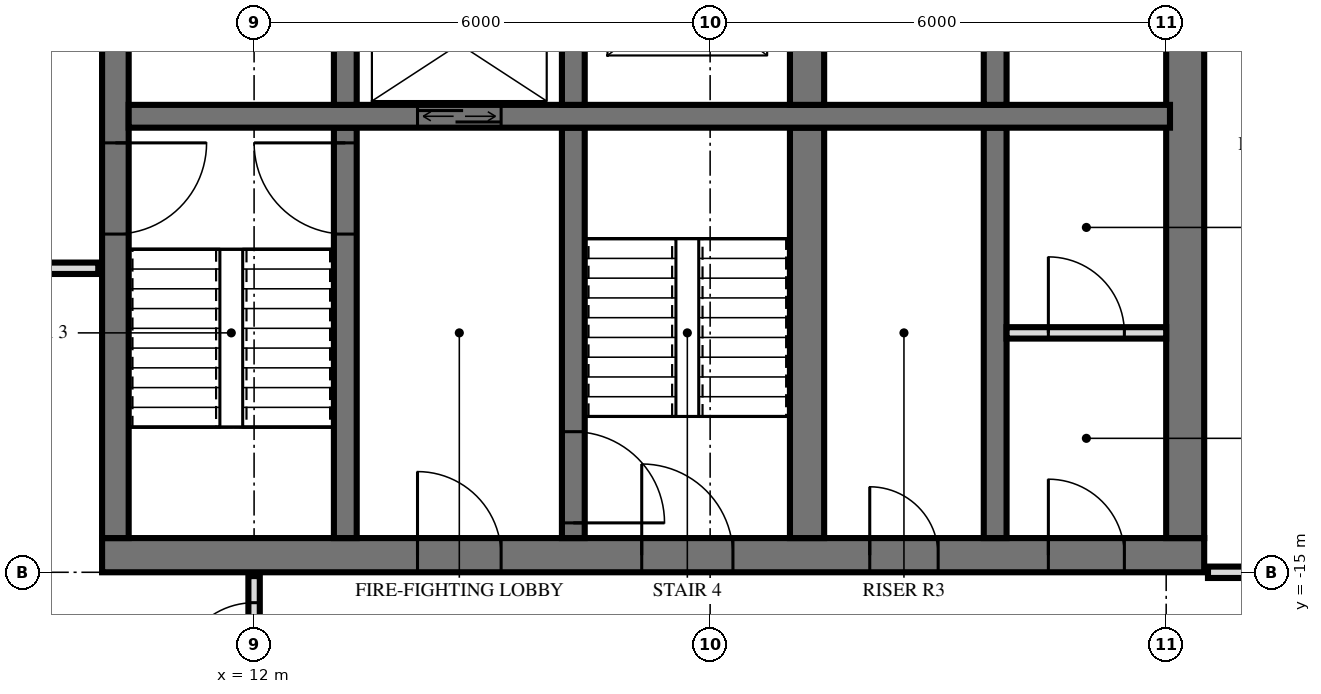
"""IFC4 building model, lengths in metres.
Left out: names, types, materials, properties, quantities, classifications, styles, units other than length and angle.
Written with IfcOpenShell. Run it as: python <this file> out.ifc"""

import sys

from ifc_helpers import new_model, si_unit, direction, frame, frame_2d, origin, place, context, subcontext, project, spatial, rectangle, extrude, element, fill, save


model = new_model("IFC4")
c1 = context("Model", 3, precision=1e-05, world=origin(), true_north=direction((0.0, 1.0)))
c2 = subcontext(c1, "Body", "Model", "MODEL_VIEW")
j1 = project(units=[si_unit("LENGTHUNIT", "METRE"), si_unit("PLANEANGLEUNIT", "RADIAN")], contexts=[c1])
p1 = place(None, origin())
s1 = spatial("IfcSite", under=j1, at=p1, CompositionType="ELEMENT")
p2 = place(p1, origin())
s2 = spatial("IfcBuilding", under=s1, at=p2, CompositionType="ELEMENT")
p3 = place(p2, frame((0.0, 0.0, 112.8)))
s3 = spatial("IfcBuildingStorey", under=s2, at=p3, CompositionType="ELEMENT", Elevation=112.8)
p4 = place(p3, frame((10.0, -14.775, 0.0), z_axis=(0.0, 0.0, 1.0), x_axis=(1.0, 0.0, 0.0)))
e1 = element("IfcWall", 1, at=p4, inside=s3, PredefinedType="SHEAR", context=c2, shape_type="SweptSolid", body=[
    extrude(rectangle(XDim=14.5, YDim=0.45, at=frame_2d((7.25, 0.0))), origin(), (0.0, 0.0, 1.0), 3.6),
])
p5 = place(p4, frame((7.1, 0.0, 0.0)))
e2 = element("IfcOpeningElement", 2, at=p5, cuts=e1, PredefinedType="OPENING", context=c2, shape_type="SweptSolid", body=[
    extrude(rectangle(XDim=1.2, YDim=2.1, at=frame_2d((0.6, 1.05))), frame((0.0, 0.235, 0.0), z_axis=(0.0, -1.0, 0.0), x_axis=(1.0, 0.0, 0.0)), (0.0, 0.0, 1.0), 0.47),
])
p6 = place(p4, frame((4.15, 0.0, 0.0)))
e3 = element("IfcOpeningElement", 3, at=p6, cuts=e1, PredefinedType="OPENING", context=c2, shape_type="SweptSolid", body=[
    extrude(rectangle(XDim=1.1, YDim=2.1, at=frame_2d((0.55, 1.05))), frame((0.0, 0.235, 0.0), z_axis=(0.0, -1.0, 0.0), x_axis=(1.0, 0.0, 0.0)), (0.0, 0.0, 1.0), 0.47),
])
p7 = place(p4, frame((10.1, 0.0, 0.0)))
e4 = element("IfcOpeningElement", 4, at=p7, cuts=e1, PredefinedType="OPENING", context=c2, shape_type="SweptSolid", body=[
    extrude(rectangle(XDim=0.9, YDim=2.1, at=frame_2d((0.45, 1.05))), frame((0.0, 0.235, 0.0), z_axis=(0.0, -1.0, 0.0), x_axis=(1.0, 0.0, 0.0)), (0.0, 0.0, 1.0), 0.47),
])
p8 = place(p4, frame((12.45, 0.0, 0.0)))
e5 = element("IfcOpeningElement", 5, at=p8, cuts=e1, PredefinedType="OPENING", context=c2, shape_type="SweptSolid", body=[
    extrude(rectangle(XDim=1.0, YDim=2.1, at=frame_2d((0.5, 1.05))), frame((0.0, 0.235, 0.0), z_axis=(0.0, -1.0, 0.0), x_axis=(1.0, 0.0, 0.0)), (0.0, 0.0, 1.0), 0.47),
])
p9 = place(p3, frame((10.175, -14.55, 0.0), z_axis=(0.0, 0.0, 1.0), x_axis=(0.0, 1.0, 0.0)))
e6 = element("IfcWall", 6, at=p9, inside=s3, PredefinedType="SHEAR", context=c2, shape_type="SweptSolid", body=[
    extrude(rectangle(XDim=14.1, YDim=0.35, at=frame_2d((7.05, 0.0))), origin(), (0.0, 0.0, 1.0), 3.6),
])
p10 = place(p9, frame((8.4, 0.0, 0.0)))
e7 = element("IfcOpeningElement", 7, at=p10, cuts=e6, PredefinedType="OPENING", context=c2, shape_type="SweptSolid", body=[
    extrude(rectangle(XDim=1.4, YDim=2.4, at=frame_2d((0.7, 1.2))), frame((0.0, 0.185, 0.0), z_axis=(0.0, -1.0, 0.0), x_axis=(1.0, 0.0, 0.0)), (0.0, 0.0, 1.0), 0.37),
])
p11 = place(p9, frame((10.0, 0.0, 0.0)))
e8 = element("IfcOpeningElement", 8, at=p11, cuts=e6, PredefinedType="OPENING", context=c2, shape_type="SweptSolid", body=[
    extrude(rectangle(XDim=1.4, YDim=2.4, at=frame_2d((0.7, 1.2))), frame((0.0, 0.185, 0.0), z_axis=(0.0, -1.0, 0.0), x_axis=(1.0, 0.0, 0.0)), (0.0, 0.0, 1.0), 0.37),
])
p12 = place(p9, frame((4.0, 0.0, 0.0)))
e9 = element("IfcOpeningElement", 9, at=p12, cuts=e6, PredefinedType="OPENING", context=c2, shape_type="SweptSolid", body=[
    extrude(rectangle(XDim=1.2, YDim=2.1, at=frame_2d((0.6, 1.05))), frame((0.0, 0.185, 0.0), z_axis=(0.0, -1.0, 0.0), x_axis=(1.0, 0.0, 0.0)), (0.0, 0.0, 1.0), 0.37),
])
p13 = place(p3, frame((24.25, -14.55, 0.0), z_axis=(0.0, 0.0, 1.0), x_axis=(0.0, 1.0, 0.0)))
e10 = element("IfcWall", 10, at=p13, inside=s3, PredefinedType="SHEAR", context=c2, shape_type="SweptSolid", body=[
    extrude(rectangle(XDim=14.1, YDim=0.5, at=frame_2d((7.05, 0.0))), origin(), (0.0, 0.0, 1.0), 3.6),
])
p14 = place(p3, frame((10.35, -9.0, 0.0), z_axis=(0.0, 0.0, 1.0), x_axis=(1.0, 0.0, 0.0)))
e11 = element("IfcWall", 11, at=p14, inside=s3, PredefinedType="SHEAR", context=c2, shape_type="SweptSolid", body=[
    extrude(rectangle(XDim=13.7, YDim=0.3, at=frame_2d((6.85, 0.0))), origin(), (0.0, 0.0, 1.0), 3.6),
])
p15 = place(p14, frame((3.8, 0.0, 0.0)))
e12 = element("IfcOpeningElement", 12, at=p15, cuts=e11, PredefinedType="OPENING", context=c2, shape_type="SweptSolid", body=[
    extrude(rectangle(XDim=1.1, YDim=2.1, at=frame_2d((0.55, 1.05))), frame((0.0, 0.16, 0.0), z_axis=(0.0, -1.0, 0.0), x_axis=(1.0, 0.0, 0.0)), (0.0, 0.0, 1.0), 0.32),
])
p16 = place(p3, frame((13.2, -8.85, 0.0), z_axis=(0.0, 0.0, 1.0), x_axis=(0.0, 1.0, 0.0)))
e13 = element("IfcWall", 13, at=p16, inside=s3, PredefinedType="SHEAR", context=c2, shape_type="SweptSolid", body=[
    extrude(rectangle(XDim=2.3, YDim=0.3, at=frame_2d((1.15, 0.0))), origin(), (0.0, 0.0, 1.0), 3.6),
])
p17 = place(p3, frame((13.2, -14.55, 0.0), z_axis=(0.0, 0.0, 1.0), x_axis=(0.0, 1.0, 0.0)))
e14 = element("IfcWall", 14, at=p17, inside=s3, PredefinedType="SHEAR", context=c2, shape_type="SweptSolid", body=[
    extrude(rectangle(XDim=5.4, YDim=0.3, at=frame_2d((2.7, 0.0))), origin(), (0.0, 0.0, 1.0), 3.6),
])
p18 = place(p17, frame((4.0, 0.0, 0.0)))
e15 = element("IfcOpeningElement", 15, at=p18, cuts=e14, PredefinedType="OPENING", context=c2, shape_type="SweptSolid", body=[
    extrude(rectangle(XDim=1.2, YDim=2.1, at=frame_2d((0.6, 1.05))), frame((0.0, 0.16, 0.0), z_axis=(0.0, -1.0, 0.0), x_axis=(1.0, 0.0, 0.0)), (0.0, 0.0, 1.0), 0.32),
])
p19 = place(p3, frame((16.2, -8.85, 0.0), z_axis=(0.0, 0.0, 1.0), x_axis=(0.0, 1.0, 0.0)))
e16 = element("IfcWall", 16, at=p19, inside=s3, PredefinedType="SHEAR", context=c2, shape_type="SweptSolid", body=[
    extrude(rectangle(XDim=2.3, YDim=0.3, at=frame_2d((1.15, 0.0))), origin(), (0.0, 0.0, 1.0), 3.6),
])
p20 = place(p3, frame((16.2, -14.55, 0.0), z_axis=(0.0, 0.0, 1.0), x_axis=(0.0, 1.0, 0.0)))
e17 = element("IfcWall", 17, at=p20, inside=s3, PredefinedType="SHEAR", context=c2, shape_type="SweptSolid", body=[
    extrude(rectangle(XDim=5.4, YDim=0.3, at=frame_2d((2.7, 0.0))), origin(), (0.0, 0.0, 1.0), 3.6),
])
p21 = place(p20, frame((0.2, 0.0, 0.0)))
e18 = element("IfcOpeningElement", 18, at=p21, cuts=e17, PredefinedType="OPENING", context=c2, shape_type="SweptSolid", body=[
    extrude(rectangle(XDim=1.2, YDim=2.1, at=frame_2d((0.6, 1.05))), frame((0.0, 0.16, 0.0), z_axis=(0.0, -1.0, 0.0), x_axis=(1.0, 0.0, 0.0)), (0.0, 0.0, 1.0), 0.32),
])
p22 = place(p3, frame((19.275, -8.85, 0.0), z_axis=(0.0, 0.0, 1.0), x_axis=(0.0, 1.0, 0.0)))
e19 = element("IfcWall", 19, at=p22, inside=s3, PredefinedType="SHEAR", context=c2, shape_type="SweptSolid", body=[
    extrude(rectangle(XDim=2.3, YDim=0.45, at=frame_2d((1.15, 0.0))), origin(), (0.0, 0.0, 1.0), 3.6),
])
p23 = place(p3, frame((19.275, -14.55, 0.0), z_axis=(0.0, 0.0, 1.0), x_axis=(0.0, 1.0, 0.0)))
e20 = element("IfcWall", 20, at=p23, inside=s3, PredefinedType="SHEAR", context=c2, shape_type="SweptSolid", body=[
    extrude(rectangle(XDim=5.4, YDim=0.45, at=frame_2d((2.7, 0.0))), origin(), (0.0, 0.0, 1.0), 3.6),
])
p24 = place(p3, frame((21.75, -8.85, 0.0), z_axis=(0.0, 0.0, 1.0), x_axis=(0.0, 1.0, 0.0)))
e21 = element("IfcWall", 21, at=p24, inside=s3, PredefinedType="SHEAR", context=c2, shape_type="SweptSolid", body=[
    extrude(rectangle(XDim=2.3, YDim=0.3, at=frame_2d((1.15, 0.0))), origin(), (0.0, 0.0, 1.0), 3.6),
])
p25 = place(p3, frame((21.75, -14.55, 0.0), z_axis=(0.0, 0.0, 1.0), x_axis=(0.0, 1.0, 0.0)))
e22 = element("IfcWall", 22, at=p25, inside=s3, PredefinedType="SHEAR", context=c2, shape_type="SweptSolid", body=[
    extrude(rectangle(XDim=5.4, YDim=0.3, at=frame_2d((2.7, 0.0))), origin(), (0.0, 0.0, 1.0), 3.6),
])
p26 = place(p3, frame((21.9, -11.85, 0.0), z_axis=(0.0, 0.0, 1.0), x_axis=(1.0, 0.0, 0.0)))
e23 = element("IfcWall", 23, at=p26, inside=s3, PredefinedType="PARTITIONING", context=c2, shape_type="SweptSolid", body=[
    extrude(rectangle(XDim=2.1, YDim=0.15, at=frame_2d((1.05, 0.0))), origin(), (0.0, 0.0, 1.0), 3.3),
])
p27 = place(p26, frame((0.55, 0.0, 0.0)))
e24 = element("IfcOpeningElement", 24, at=p27, cuts=e23, PredefinedType="OPENING", context=c2, shape_type="SweptSolid", body=[
    extrude(rectangle(XDim=1.0, YDim=2.1, at=frame_2d((0.5, 1.05))), frame((0.0, 0.085, 0.0), z_axis=(0.0, -1.0, 0.0), x_axis=(1.0, 0.0, 0.0)), (0.0, 0.0, 1.0), 0.17),
])
p28 = place(p3, frame((12.0, -16.8, 0.0), z_axis=(0.0, 0.0, 1.0), x_axis=(0.0, 1.0, 0.0)))
e25 = element("IfcWall", 25, at=p28, inside=s3, PredefinedType="PARTITIONING", context=c2, shape_type="SweptSolid", body=[
    extrude(rectangle(XDim=1.75, YDim=0.15, at=frame_2d((0.875, 0.0))), origin(), (0.0, 0.0, 1.0), 3.32),
])
p29 = place(p28, frame((0.4, 0.0, 0.0)))
e26 = element("IfcOpeningElement", 26, at=p29, cuts=e25, PredefinedType="OPENING", context=c2, shape_type="SweptSolid", body=[
    extrude(rectangle(XDim=1.0, YDim=2.1, at=frame_2d((0.5, 1.05))), frame((0.0, 0.085, 0.0), z_axis=(0.0, -1.0, 0.0), x_axis=(1.0, 0.0, 0.0)), (0.0, 0.0, 1.0), 0.17),
])
p30 = place(p3, frame((24.55, -15.0, 0.0), z_axis=(0.0, 0.0, 1.0), x_axis=(1.0, 0.0, 0.0)))
e27 = element("IfcWall", 27, at=p30, inside=s3, PredefinedType="PARTITIONING", context=c2, shape_type="SweptSolid", body=[
    extrude(rectangle(XDim=3.47, YDim=0.15, at=frame_2d((1.735, 0.0))), origin(), (0.0, 0.0, 1.0), 3.32),
])
p31 = place(p30, frame((0.9, 0.0, 0.0)))
e28 = element("IfcOpeningElement", 28, at=p31, cuts=e27, PredefinedType="OPENING", context=c2, shape_type="SweptSolid", body=[
    extrude(rectangle(XDim=1.0, YDim=2.1, at=frame_2d((0.5, 1.05))), frame((0.0, 0.085, 0.0), z_axis=(0.0, -1.0, 0.0), x_axis=(1.0, 0.0, 0.0)), (0.0, 0.0, 1.0), 0.17),
])
p32 = place(p3, frame((-9.95, -11.0, 0.0), z_axis=(0.0, 0.0, 1.0), x_axis=(1.0, 0.0, 0.0)))
e29 = element("IfcWall", 29, at=p32, inside=s3, PredefinedType="PARTITIONING", context=c2, shape_type="SweptSolid", body=[
    extrude(rectangle(XDim=19.9, YDim=0.15, at=frame_2d((9.95, 0.0))), origin(), (0.0, 0.0, 1.0), 3.32),
])
p33 = place(p32, frame((9.45, 0.0, 0.0)))
e30 = element("IfcOpeningElement", 30, at=p33, cuts=e29, PredefinedType="OPENING", context=c2, shape_type="SweptSolid", body=[
    extrude(rectangle(XDim=1.0, YDim=2.1, at=frame_2d((0.5, 1.05))), frame((0.0, 0.085, 0.0), z_axis=(0.0, -1.0, 0.0), x_axis=(1.0, 0.0, 0.0)), (0.0, 0.0, 1.0), 0.17),
])
p34 = place(p32, frame((15.45, 0.0, 0.0)))
e31 = element("IfcOpeningElement", 31, at=p34, cuts=e29, PredefinedType="OPENING", context=c2, shape_type="SweptSolid", body=[
    extrude(rectangle(XDim=1.0, YDim=2.1, at=frame_2d((0.5, 1.05))), frame((0.0, 0.085, 0.0), z_axis=(0.0, -1.0, 0.0), x_axis=(1.0, 0.0, 0.0)), (0.0, 0.0, 1.0), 0.17),
])
p35 = place(p15, origin())
e32 = element("IfcDoor", 32, at=p35, inside=s3, OperationType="DOUBLE_DOOR_SLIDING", PredefinedType="USERDEFINED", context=c2, shape_type="SweptSolid", body=[
    extrude(rectangle(XDim=1.1, YDim=2.1, at=frame_2d((0.55, 1.05))), frame((0.0, 0.025, 0.0), z_axis=(0.0, -1.0, 0.0), x_axis=(1.0, 0.0, 0.0)), (0.0, 0.0, 1.0), 0.05),
])
fill(e12, e32)
p36 = place(p12, frame((0.6, 0.0, 0.0), z_axis=(0.0, 0.0, 1.0), x_axis=(-1.0, 0.0, 0.0)))
e33 = element("IfcDoor", 33, at=p36, inside=s3, OperationType="SINGLE_SWING_RIGHT", PredefinedType="DOOR", context=c2, shape_type="SweptSolid", body=[
    extrude(rectangle(XDim=1.2, YDim=2.1, at=frame_2d((0.0, 1.05))), frame((0.0, -0.025, 0.0), z_axis=(0.0, 1.0, 0.0), x_axis=(-1.0, 0.0, 0.0)), (0.0, 0.0, 1.0), 0.05),
])
fill(e9, e33)
p37 = place(p5, origin())
e34 = element("IfcDoor", 34, at=p37, inside=s3, OperationType="SINGLE_SWING_RIGHT", PredefinedType="DOOR", context=c2, shape_type="SweptSolid", body=[
    extrude(rectangle(XDim=1.2, YDim=2.1, at=frame_2d((0.6, 1.05))), frame((0.0, 0.025, 0.0), z_axis=(0.0, -1.0, 0.0), x_axis=(1.0, 0.0, 0.0)), (0.0, 0.0, 1.0), 0.05),
])
fill(e2, e34)
p38 = place(p6, origin())
e35 = element("IfcDoor", 35, at=p38, inside=s3, OperationType="SINGLE_SWING_RIGHT", PredefinedType="DOOR", context=c2, shape_type="SweptSolid", body=[
    extrude(rectangle(XDim=1.1, YDim=2.1, at=frame_2d((0.55, 1.05))), frame((0.0, 0.025, 0.0), z_axis=(0.0, -1.0, 0.0), x_axis=(1.0, 0.0, 0.0)), (0.0, 0.0, 1.0), 0.05),
])
fill(e3, e35)
p39 = place(p7, origin())
e36 = element("IfcDoor", 36, at=p39, inside=s3, OperationType="SINGLE_SWING_RIGHT", PredefinedType="DOOR", context=c2, shape_type="SweptSolid", body=[
    extrude(rectangle(XDim=0.9, YDim=2.1, at=frame_2d((0.45, 1.05))), frame((0.0, 0.025, 0.0), z_axis=(0.0, -1.0, 0.0), x_axis=(1.0, 0.0, 0.0)), (0.0, 0.0, 1.0), 0.05),
])
fill(e4, e36)
p40 = place(p8, origin())
e37 = element("IfcDoor", 37, at=p40, inside=s3, OperationType="SINGLE_SWING_RIGHT", PredefinedType="DOOR", context=c2, shape_type="SweptSolid", body=[
    extrude(rectangle(XDim=1.0, YDim=2.1, at=frame_2d((0.5, 1.05))), frame((0.0, 0.025, 0.0), z_axis=(0.0, -1.0, 0.0), x_axis=(1.0, 0.0, 0.0)), (0.0, 0.0, 1.0), 0.05),
])
fill(e5, e37)
p41 = place(p18, origin())
e38 = element("IfcDoor", 38, at=p41, inside=s3, OperationType="SINGLE_SWING_LEFT", PredefinedType="DOOR", context=c2, shape_type="SweptSolid", body=[
    extrude(rectangle(XDim=1.2, YDim=2.1, at=frame_2d((0.6, 1.05))), frame((0.0, 0.025, 0.0), z_axis=(0.0, -1.0, 0.0), x_axis=(1.0, 0.0, 0.0)), (0.0, 0.0, 1.0), 0.05),
])
fill(e15, e38)
p42 = place(p21, frame((0.6, 0.0, 0.0), z_axis=(0.0, 0.0, 1.0), x_axis=(-1.0, 0.0, 0.0)))
e39 = element("IfcDoor", 39, at=p42, inside=s3, OperationType="SINGLE_SWING_LEFT", PredefinedType="DOOR", context=c2, shape_type="SweptSolid", body=[
    extrude(rectangle(XDim=1.2, YDim=2.1, at=frame_2d((0.0, 1.05))), frame((0.0, -0.025, 0.0), z_axis=(0.0, 1.0, 0.0), x_axis=(-1.0, 0.0, 0.0)), (0.0, 0.0, 1.0), 0.05),
])
fill(e18, e39)
p43 = place(p27, origin())
e40 = element("IfcDoor", 40, at=p43, inside=s3, OperationType="SINGLE_SWING_RIGHT", PredefinedType="DOOR", context=c2, shape_type="SweptSolid", body=[
    extrude(rectangle(XDim=1.0, YDim=2.1, at=frame_2d((0.5, 1.05))), frame((0.0, 0.025, 0.0), z_axis=(0.0, -1.0, 0.0), x_axis=(1.0, 0.0, 0.0)), (0.0, 0.0, 1.0), 0.05),
])
fill(e24, e40)
p44 = place(p29, origin())
e41 = element("IfcDoor", 41, at=p44, inside=s3, OperationType="SINGLE_SWING_RIGHT", PredefinedType="DOOR", context=c2, shape_type="SweptSolid", body=[
    extrude(rectangle(XDim=1.0, YDim=2.1, at=frame_2d((0.5, 1.05))), frame((0.0, 0.025, 0.0), z_axis=(0.0, -1.0, 0.0), x_axis=(1.0, 0.0, 0.0)), (0.0, 0.0, 1.0), 0.05),
])
fill(e26, e41)
save(model, sys.argv[1])
